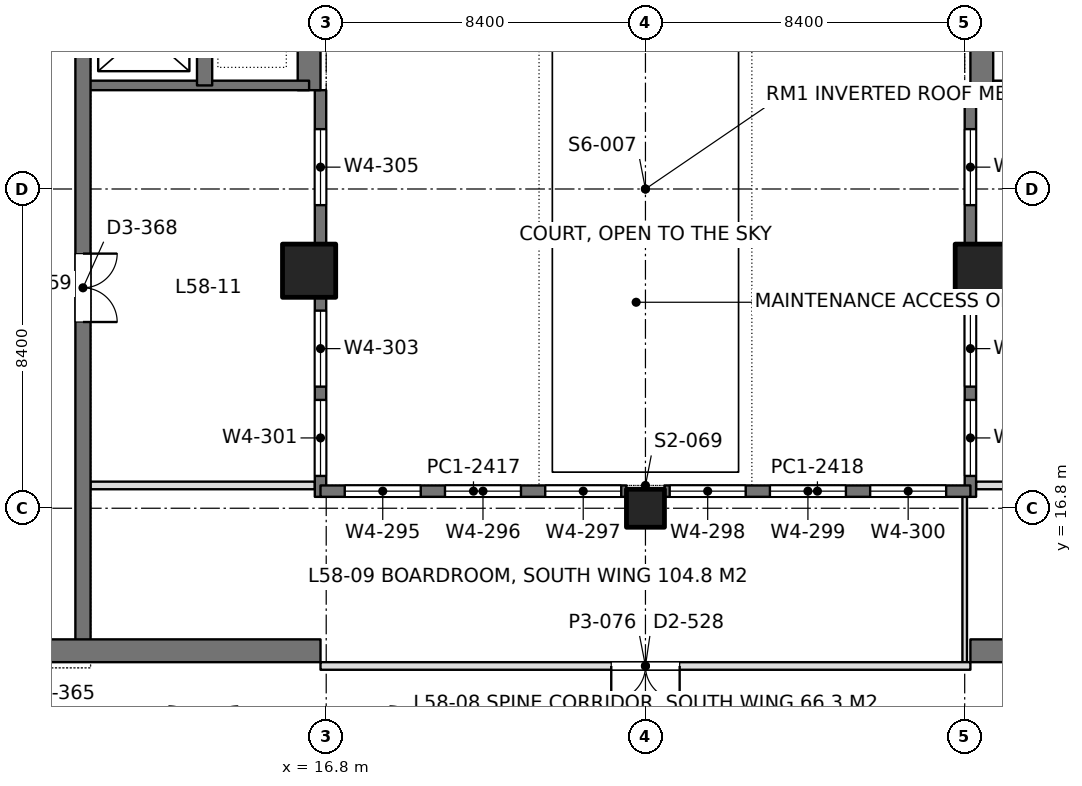
"""IFC4 building model, lengths in metres.
Left out: names, types, materials, properties, quantities, classifications, styles, units other than length and angle.
Written with IfcOpenShell. Run it as: python <this file> out.ifc"""

import sys

from ifc_helpers import new_model, si_unit, direction, frame, frame_2d, origin, origin_2d, place, context, subcontext, project, spatial, rectangle, extrude, element, fill, save


model = new_model("IFC4")
c1 = context("Model", 3, precision=1e-05, world=origin(), true_north=direction((0.0, 1.0)))
c2 = subcontext(c1, "Body", "Model", "MODEL_VIEW")
j1 = project(units=[si_unit("LENGTHUNIT", "METRE"), si_unit("PLANEANGLEUNIT", "RADIAN")], contexts=[c1])
p1 = place(None, origin())
s1 = spatial("IfcSite", under=j1, at=p1, CompositionType="ELEMENT")
p2 = place(p1, origin())
s2 = spatial("IfcBuilding", under=s1, at=p2, CompositionType="ELEMENT")
p3 = place(p2, frame((0.0, 0.0, 254.7)))
s3 = spatial("IfcBuildingStorey", under=s2, at=p3, CompositionType="ELEMENT", Elevation=254.7)
p4 = place(p3, frame((25.2, 16.8, 0.0), z_axis=(0.0, 0.0, 1.0), x_axis=(1.0, 0.0, 0.0)))
e1 = element("IfcColumn", 1, at=p4, inside=s3, PredefinedType="COLUMN", context=c2, shape_type="SweptSolid", body=[
    extrude(rectangle(XDim=1.0, YDim=1.0, at=origin_2d()), origin(), (0.0, 0.0, 1.0), 4.5),
])
for number, where, z_axis, x_axis in (
    (2, (16.35, 23.05, 0.0), (0.0, 0.0, 1.0), (1.0, 0.0, 0.0)),
    (3, (34.05, 23.05, 0.0), (0.0, 0.0, 1.0), (1.0, 0.0, 0.0)),
):
    element("IfcColumn", number, at=place(p3, frame(where, z_axis=z_axis, x_axis=x_axis)), inside=s3, PredefinedType="COLUMN", context=c2, shape_type="SweptSolid", body=[
        extrude(rectangle(XDim=1.4, YDim=1.4, at=origin_2d()), origin(), (0.0, 0.0, 1.0), 4.5),
    ])
p5 = place(p3, frame((-1.05, 13.05, 0.0), z_axis=(0.0, 0.0, 1.0), x_axis=(1.0, 0.0, 0.0)))
e4 = element("IfcWall", 4, at=p5, inside=s3, PredefinedType="SHEAR", context=c2, shape_type="SweptSolid", body=[
    extrude(rectangle(XDim=17.7, YDim=0.6, at=frame_2d((8.85, 0.0))), origin(), (0.0, 0.0, 1.0), 4.5),
])
p6 = place(p5, frame((8.8, 0.0, 0.0)))
e5 = element("IfcOpeningElement", 5, at=p6, cuts=e4, PredefinedType="OPENING", context=c2, shape_type="SweptSolid", body=[
    extrude(rectangle(XDim=1.8, YDim=2.4, at=frame_2d((0.9, 1.2))), frame((0.0, 0.31, 0.0), z_axis=(0.0, -1.0, 0.0), x_axis=(1.0, 0.0, 0.0)), (0.0, 0.0, 1.0), 0.62),
])
p7 = place(p3, frame((16.35, 27.8, 0.0), z_axis=(0.0, 0.0, 1.0), x_axis=(0.0, 1.0, 0.0)))
e6 = element("IfcWall", 6, at=p7, inside=s3, PredefinedType="SHEAR", context=c2, shape_type="SweptSolid", body=[
    extrude(rectangle(XDim=9.55, YDim=0.6, at=frame_2d((4.775, 0.0))), origin(), (0.0, 0.0, 1.0), 4.5),
])
p8 = place(p3, frame((10.4, 13.05, 0.0), z_axis=(0.0, 0.0, 1.0), x_axis=(0.0, 1.0, 0.0)))
e7 = element("IfcWall", 7, at=p8, inside=s3, PredefinedType="SHEAR", context=c2, shape_type="SweptSolid", body=[
    extrude(rectangle(XDim=24.3, YDim=0.4, at=frame_2d((12.15, 0.0))), origin(), (0.0, 0.0, 1.0), 4.5),
])
p9 = place(p8, frame((15.75, 0.0, 0.0)))
e8 = element("IfcOpeningElement", 8, at=p9, cuts=e7, PredefinedType="OPENING", context=c2, shape_type="SweptSolid", body=[
    extrude(rectangle(XDim=1.1, YDim=2.2, at=frame_2d((0.55, 1.1))), frame((0.0, 0.21, 0.0), z_axis=(0.0, -1.0, 0.0), x_axis=(1.0, 0.0, 0.0)), (0.0, 0.0, 1.0), 0.42),
])
p10 = place(p8, frame((18.6, 0.0, 0.0)))
e9 = element("IfcOpeningElement", 9, at=p10, cuts=e7, PredefinedType="OPENING", context=c2, shape_type="SweptSolid", body=[
    extrude(rectangle(XDim=1.1, YDim=2.2, at=frame_2d((0.55, 1.1))), frame((0.0, 0.21, 0.0), z_axis=(0.0, -1.0, 0.0), x_axis=(1.0, 0.0, 0.0)), (0.0, 0.0, 1.0), 0.42),
])
p11 = place(p8, frame((21.45, 0.0, 0.0)))
e10 = element("IfcOpeningElement", 10, at=p11, cuts=e7, PredefinedType="OPENING", context=c2, shape_type="SweptSolid", body=[
    extrude(rectangle(XDim=1.1, YDim=2.2, at=frame_2d((0.55, 1.1))), frame((0.0, 0.21, 0.0), z_axis=(0.0, -1.0, 0.0), x_axis=(1.0, 0.0, 0.0)), (0.0, 0.0, 1.0), 0.42),
])
p12 = place(p8, frame((8.65, 0.0, 0.0)))
e11 = element("IfcOpeningElement", 11, at=p12, cuts=e7, PredefinedType="OPENING", context=c2, shape_type="SweptSolid", body=[
    extrude(rectangle(XDim=1.8, YDim=2.4, at=frame_2d((0.9, 1.2))), frame((0.0, 0.21, 0.0), z_axis=(0.0, -1.0, 0.0), x_axis=(1.0, 0.0, 0.0)), (0.0, 0.0, 1.0), 0.42),
])
p13 = place(p3, frame((13.6, 27.925, 0.0), z_axis=(0.0, 0.0, 1.0), x_axis=(0.0, 1.0, 0.0)))
e12 = element("IfcWall", 12, at=p13, inside=s3, PredefinedType="SHEAR", context=c2, shape_type="SweptSolid", body=[
    extrude(rectangle(XDim=9.425, YDim=0.4, at=frame_2d((4.712, 0.0))), origin(), (0.0, 0.0, 1.0), 4.5),
])
p14 = place(p3, frame((10.4, 27.925, 0.0), z_axis=(0.0, 0.0, 1.0), x_axis=(1.0, 0.0, 0.0)))
e13 = element("IfcWall", 13, at=p14, inside=s3, PredefinedType="SHEAR", context=c2, shape_type="SweptSolid", body=[
    extrude(rectangle(XDim=5.95, YDim=0.25, at=frame_2d((2.975, 0.0))), origin(), (0.0, 0.0, 1.0), 4.5),
])
p15 = place(p3, frame((33.75, 13.05, 0.0), z_axis=(0.0, 0.0, 1.0), x_axis=(1.0, 0.0, 0.0)))
e14 = element("IfcWall", 14, at=p15, inside=s3, PredefinedType="SHEAR", context=c2, shape_type="SweptSolid", body=[
    extrude(rectangle(XDim=17.7, YDim=0.6, at=frame_2d((8.85, 0.0))), origin(), (0.0, 0.0, 1.0), 4.5),
])
p16 = place(p15, frame((7.1, 0.0, 0.0)))
e15 = element("IfcOpeningElement", 15, at=p16, cuts=e14, PredefinedType="OPENING", context=c2, shape_type="SweptSolid", body=[
    extrude(rectangle(XDim=1.8, YDim=2.4, at=frame_2d((0.9, 1.2))), frame((0.0, 0.31, 0.0), z_axis=(0.0, -1.0, 0.0), x_axis=(1.0, 0.0, 0.0)), (0.0, 0.0, 1.0), 0.62),
])
p17 = place(p3, frame((34.05, 27.8, 0.0), z_axis=(0.0, 0.0, 1.0), x_axis=(0.0, 1.0, 0.0)))
e16 = element("IfcWall", 16, at=p17, inside=s3, PredefinedType="SHEAR", context=c2, shape_type="SweptSolid", body=[
    extrude(rectangle(XDim=9.55, YDim=0.6, at=frame_2d((4.775, 0.0))), origin(), (0.0, 0.0, 1.0), 4.5),
])
p18 = place(p3, frame((40.0, 27.925, 0.0), z_axis=(0.0, 0.0, 1.0), x_axis=(-1.0, 0.0, 0.0)))
e17 = element("IfcWall", 17, at=p18, inside=s3, PredefinedType="SHEAR", context=c2, shape_type="SweptSolid", body=[
    extrude(rectangle(XDim=5.95, YDim=0.25, at=frame_2d((2.975, 0.0))), origin(), (0.0, 0.0, 1.0), 4.5),
])
p19 = place(p3, frame((16.65, 17.1, 0.0), z_axis=(0.0, 0.0, 1.0), x_axis=(0.0, 1.0, 0.0)))
e18 = element("IfcWall", 18, at=p19, inside=s3, PredefinedType="SOLIDWALL", context=c2, shape_type="SweptSolid", body=[
    extrude(rectangle(XDim=10.7, YDim=0.3, at=frame_2d((5.35, 0.0))), origin(), (0.0, 0.0, 1.0), 4.35),
])
p20 = place(p19, frame((0.55, 0.0, 0.9)))
e19 = element("IfcOpeningElement", 19, at=p20, cuts=e18, PredefinedType="OPENING", context=c2, shape_type="SweptSolid", body=[
    extrude(rectangle(XDim=2.0, YDim=1.9, at=frame_2d((1.0, 0.95))), frame((0.0, 0.16, 0.0), z_axis=(0.0, -1.0, 0.0), x_axis=(1.0, 0.0, 0.0)), (0.0, 0.0, 1.0), 0.32),
])
p21 = place(p19, frame((2.9, 0.0, 0.9)))
e20 = element("IfcOpeningElement", 20, at=p21, cuts=e18, PredefinedType="OPENING", context=c2, shape_type="SweptSolid", body=[
    extrude(rectangle(XDim=2.0, YDim=1.9, at=frame_2d((1.0, 0.95))), frame((0.0, 0.16, 0.0), z_axis=(0.0, -1.0, 0.0), x_axis=(1.0, 0.0, 0.0)), (0.0, 0.0, 1.0), 0.32),
])
p22 = place(p19, frame((7.675, 0.0, 0.9)))
e21 = element("IfcOpeningElement", 21, at=p22, cuts=e18, PredefinedType="OPENING", context=c2, shape_type="SweptSolid", body=[
    extrude(rectangle(XDim=2.0, YDim=1.9, at=frame_2d((1.0, 0.95))), frame((0.0, 0.16, 0.0), z_axis=(0.0, -1.0, 0.0), x_axis=(1.0, 0.0, 0.0)), (0.0, 0.0, 1.0), 0.32),
])
p23 = place(p3, frame((33.75, 17.1, 0.0), z_axis=(0.0, 0.0, 1.0), x_axis=(0.0, 1.0, 0.0)))
e22 = element("IfcWall", 22, at=p23, inside=s3, PredefinedType="SOLIDWALL", context=c2, shape_type="SweptSolid", body=[
    extrude(rectangle(XDim=10.7, YDim=0.3, at=frame_2d((5.35, 0.0))), origin(), (0.0, 0.0, 1.0), 4.35),
])
p24 = place(p23, frame((0.55, 0.0, 0.9)))
e23 = element("IfcOpeningElement", 23, at=p24, cuts=e22, PredefinedType="OPENING", context=c2, shape_type="SweptSolid", body=[
    extrude(rectangle(XDim=2.0, YDim=1.9, at=frame_2d((1.0, 0.95))), frame((0.0, 0.16, 0.0), z_axis=(0.0, -1.0, 0.0), x_axis=(1.0, 0.0, 0.0)), (0.0, 0.0, 1.0), 0.32),
])
p25 = place(p23, frame((2.9, 0.0, 0.9)))
e24 = element("IfcOpeningElement", 24, at=p25, cuts=e22, PredefinedType="OPENING", context=c2, shape_type="SweptSolid", body=[
    extrude(rectangle(XDim=2.0, YDim=1.9, at=frame_2d((1.0, 0.95))), frame((0.0, 0.16, 0.0), z_axis=(0.0, -1.0, 0.0), x_axis=(1.0, 0.0, 0.0)), (0.0, 0.0, 1.0), 0.32),
])
p26 = place(p23, frame((7.675, 0.0, 0.9)))
e25 = element("IfcOpeningElement", 25, at=p26, cuts=e22, PredefinedType="OPENING", context=c2, shape_type="SweptSolid", body=[
    extrude(rectangle(XDim=2.0, YDim=1.9, at=frame_2d((1.0, 0.95))), frame((0.0, 0.16, 0.0), z_axis=(0.0, -1.0, 0.0), x_axis=(1.0, 0.0, 0.0)), (0.0, 0.0, 1.0), 0.32),
])
p27 = place(p3, frame((16.65, 17.25, 0.0), z_axis=(0.0, 0.0, 1.0), x_axis=(1.0, 0.0, 0.0)))
e26 = element("IfcWall", 26, at=p27, inside=s3, PredefinedType="SOLIDWALL", context=c2, shape_type="SweptSolid", body=[
    extrude(rectangle(XDim=8.05, YDim=0.3, at=frame_2d((4.025, 0.0))), origin(), (0.0, 0.0, 1.0), 4.35),
])
p28 = place(p27, frame((0.637, 0.0, 0.9)))
e27 = element("IfcOpeningElement", 27, at=p28, cuts=e26, PredefinedType="OPENING", context=c2, shape_type="SweptSolid", body=[
    extrude(rectangle(XDim=2.0, YDim=1.9, at=frame_2d((1.0, 0.95))), frame((0.0, 0.16, 0.0), z_axis=(0.0, -1.0, 0.0), x_axis=(1.0, 0.0, 0.0)), (0.0, 0.0, 1.0), 0.32),
])
p29 = place(p27, frame((3.275, 0.0, 0.9)))
e28 = element("IfcOpeningElement", 28, at=p29, cuts=e26, PredefinedType="OPENING", context=c2, shape_type="SweptSolid", body=[
    extrude(rectangle(XDim=2.0, YDim=1.9, at=frame_2d((1.0, 0.95))), frame((0.0, 0.16, 0.0), z_axis=(0.0, -1.0, 0.0), x_axis=(1.0, 0.0, 0.0)), (0.0, 0.0, 1.0), 0.32),
])
p30 = place(p27, frame((5.913, 0.0, 0.9)))
e29 = element("IfcOpeningElement", 29, at=p30, cuts=e26, PredefinedType="OPENING", context=c2, shape_type="SweptSolid", body=[
    extrude(rectangle(XDim=2.0, YDim=1.9, at=frame_2d((1.0, 0.95))), frame((0.0, 0.16, 0.0), z_axis=(0.0, -1.0, 0.0), x_axis=(1.0, 0.0, 0.0)), (0.0, 0.0, 1.0), 0.32),
])
p31 = place(p3, frame((25.7, 17.25, 0.0), z_axis=(0.0, 0.0, 1.0), x_axis=(1.0, 0.0, 0.0)))
e30 = element("IfcWall", 30, at=p31, inside=s3, PredefinedType="SOLIDWALL", context=c2, shape_type="SweptSolid", body=[
    extrude(rectangle(XDim=8.05, YDim=0.3, at=frame_2d((4.025, 0.0))), origin(), (0.0, 0.0, 1.0), 4.35),
])
p32 = place(p31, frame((0.137, 0.0, 0.9)))
e31 = element("IfcOpeningElement", 31, at=p32, cuts=e30, PredefinedType="OPENING", context=c2, shape_type="SweptSolid", body=[
    extrude(rectangle(XDim=2.0, YDim=1.9, at=frame_2d((1.0, 0.95))), frame((0.0, 0.16, 0.0), z_axis=(0.0, -1.0, 0.0), x_axis=(1.0, 0.0, 0.0)), (0.0, 0.0, 1.0), 0.32),
])
p33 = place(p31, frame((2.775, 0.0, 0.9)))
e32 = element("IfcOpeningElement", 32, at=p33, cuts=e30, PredefinedType="OPENING", context=c2, shape_type="SweptSolid", body=[
    extrude(rectangle(XDim=2.0, YDim=1.9, at=frame_2d((1.0, 0.95))), frame((0.0, 0.16, 0.0), z_axis=(0.0, -1.0, 0.0), x_axis=(1.0, 0.0, 0.0)), (0.0, 0.0, 1.0), 0.32),
])
p34 = place(p31, frame((5.413, 0.0, 0.9)))
e33 = element("IfcOpeningElement", 33, at=p34, cuts=e30, PredefinedType="OPENING", context=c2, shape_type="SweptSolid", body=[
    extrude(rectangle(XDim=2.0, YDim=1.9, at=frame_2d((1.0, 0.95))), frame((0.0, 0.16, 0.0), z_axis=(0.0, -1.0, 0.0), x_axis=(1.0, 0.0, 0.0)), (0.0, 0.0, 1.0), 0.32),
])
for number, where, z_axis, x_axis in (
    (34, (10.598, 17.4, 0.0), (0.0, 0.0, 1.0), (1.0, 0.0, 0.0)),
    (35, (33.898, 17.4, 0.0), (0.0, 0.0, 1.0), (1.0, 0.0, 0.0)),
):
    element("IfcWall", number, at=place(p3, frame(where, z_axis=z_axis, x_axis=x_axis)), inside=s3, PredefinedType="PARTITIONING", context=c2, shape_type="SweptSolid", body=[
        extrude(rectangle(XDim=5.904, YDim=0.2, at=frame_2d((2.952, 0.0))), origin(), (0.0, 0.0, 1.0), 3.8),
    ])
p35 = place(p3, frame((33.6, 12.6, 0.0), z_axis=(0.0, 0.0, 1.0), x_axis=(0.0, 1.0, 0.0)))
e36 = element("IfcWall", 36, at=p35, inside=s3, PredefinedType="PARTITIONING", context=c2, shape_type="SweptSolid", body=[
    extrude(rectangle(XDim=4.502, YDim=0.12, at=frame_2d((2.251, 0.0))), origin(), (0.0, 0.0, 1.0), 3.66),
])
p36 = place(p3, frame((16.65, 12.65, 0.0), z_axis=(0.0, 0.0, 1.0), x_axis=(1.0, 0.0, 0.0)))
e37 = element("IfcWall", 37, at=p36, inside=s3, PredefinedType="PARTITIONING", context=c2, shape_type="SweptSolid", body=[
    extrude(rectangle(XDim=17.1, YDim=0.2, at=frame_2d((8.55, 0.0))), origin(), (0.0, 0.0, 1.0), 3.8),
])
p37 = place(p36, frame((7.65, 0.0, 0.0)))
e38 = element("IfcOpeningElement", 38, at=p37, cuts=e37, PredefinedType="OPENING", context=c2, shape_type="SweptSolid", body=[
    extrude(rectangle(XDim=1.8, YDim=2.2, at=frame_2d((0.9, 1.1))), frame((0.0, 0.11, 0.0), z_axis=(0.0, -1.0, 0.0), x_axis=(1.0, 0.0, 0.0)), (0.0, 0.0, 1.0), 0.22),
])
p38 = place(p20, origin())
e39 = element("IfcWindow", 39, at=p38, inside=s3, PartitioningType="SINGLE_PANEL", PredefinedType="WINDOW", context=c2, shape_type="SweptSolid", body=[
    extrude(rectangle(XDim=2.0, YDim=1.9, at=frame_2d((1.0, 0.95))), frame((0.0, 0.03, 0.0), z_axis=(0.0, -1.0, 0.0), x_axis=(1.0, 0.0, 0.0)), (0.0, 0.0, 1.0), 0.06),
])
fill(e19, e39)
p39 = place(p21, origin())
e40 = element("IfcWindow", 40, at=p39, inside=s3, PartitioningType="SINGLE_PANEL", PredefinedType="WINDOW", context=c2, shape_type="SweptSolid", body=[
    extrude(rectangle(XDim=2.0, YDim=1.9, at=frame_2d((1.0, 0.95))), frame((0.0, 0.03, 0.0), z_axis=(0.0, -1.0, 0.0), x_axis=(1.0, 0.0, 0.0)), (0.0, 0.0, 1.0), 0.06),
])
fill(e20, e40)
p40 = place(p22, origin())
e41 = element("IfcWindow", 41, at=p40, inside=s3, PartitioningType="SINGLE_PANEL", PredefinedType="WINDOW", context=c2, shape_type="SweptSolid", body=[
    extrude(rectangle(XDim=2.0, YDim=1.9, at=frame_2d((1.0, 0.95))), frame((0.0, 0.03, 0.0), z_axis=(0.0, -1.0, 0.0), x_axis=(1.0, 0.0, 0.0)), (0.0, 0.0, 1.0), 0.06),
])
fill(e21, e41)
p41 = place(p24, origin())
e42 = element("IfcWindow", 42, at=p41, inside=s3, PartitioningType="SINGLE_PANEL", PredefinedType="WINDOW", context=c2, shape_type="SweptSolid", body=[
    extrude(rectangle(XDim=2.0, YDim=1.9, at=frame_2d((1.0, 0.95))), frame((0.0, 0.03, 0.0), z_axis=(0.0, -1.0, 0.0), x_axis=(1.0, 0.0, 0.0)), (0.0, 0.0, 1.0), 0.06),
])
fill(e23, e42)
p42 = place(p25, origin())
e43 = element("IfcWindow", 43, at=p42, inside=s3, PartitioningType="SINGLE_PANEL", PredefinedType="WINDOW", context=c2, shape_type="SweptSolid", body=[
    extrude(rectangle(XDim=2.0, YDim=1.9, at=frame_2d((1.0, 0.95))), frame((0.0, 0.03, 0.0), z_axis=(0.0, -1.0, 0.0), x_axis=(1.0, 0.0, 0.0)), (0.0, 0.0, 1.0), 0.06),
])
fill(e24, e43)
p43 = place(p26, origin())
e44 = element("IfcWindow", 44, at=p43, inside=s3, PartitioningType="SINGLE_PANEL", PredefinedType="WINDOW", context=c2, shape_type="SweptSolid", body=[
    extrude(rectangle(XDim=2.0, YDim=1.9, at=frame_2d((1.0, 0.95))), frame((0.0, 0.03, 0.0), z_axis=(0.0, -1.0, 0.0), x_axis=(1.0, 0.0, 0.0)), (0.0, 0.0, 1.0), 0.06),
])
fill(e25, e44)
p44 = place(p28, origin())
e45 = element("IfcWindow", 45, at=p44, inside=s3, PartitioningType="SINGLE_PANEL", PredefinedType="WINDOW", context=c2, shape_type="SweptSolid", body=[
    extrude(rectangle(XDim=2.0, YDim=1.9, at=frame_2d((1.0, 0.95))), frame((0.0, 0.03, 0.0), z_axis=(0.0, -1.0, 0.0), x_axis=(1.0, 0.0, 0.0)), (0.0, 0.0, 1.0), 0.06),
])
fill(e27, e45)
p45 = place(p29, origin())
e46 = element("IfcWindow", 46, at=p45, inside=s3, PartitioningType="SINGLE_PANEL", PredefinedType="WINDOW", context=c2, shape_type="SweptSolid", body=[
    extrude(rectangle(XDim=2.0, YDim=1.9, at=frame_2d((1.0, 0.95))), frame((0.0, 0.03, 0.0), z_axis=(0.0, -1.0, 0.0), x_axis=(1.0, 0.0, 0.0)), (0.0, 0.0, 1.0), 0.06),
])
fill(e28, e46)
p46 = place(p30, origin())
e47 = element("IfcWindow", 47, at=p46, inside=s3, PartitioningType="SINGLE_PANEL", PredefinedType="WINDOW", context=c2, shape_type="SweptSolid", body=[
    extrude(rectangle(XDim=2.0, YDim=1.9, at=frame_2d((1.0, 0.95))), frame((0.0, 0.03, 0.0), z_axis=(0.0, -1.0, 0.0), x_axis=(1.0, 0.0, 0.0)), (0.0, 0.0, 1.0), 0.06),
])
fill(e29, e47)
p47 = place(p32, origin())
e48 = element("IfcWindow", 48, at=p47, inside=s3, PartitioningType="SINGLE_PANEL", PredefinedType="WINDOW", context=c2, shape_type="SweptSolid", body=[
    extrude(rectangle(XDim=2.0, YDim=1.9, at=frame_2d((1.0, 0.95))), frame((0.0, 0.03, 0.0), z_axis=(0.0, -1.0, 0.0), x_axis=(1.0, 0.0, 0.0)), (0.0, 0.0, 1.0), 0.06),
])
fill(e31, e48)
p48 = place(p33, origin())
e49 = element("IfcWindow", 49, at=p48, inside=s3, PartitioningType="SINGLE_PANEL", PredefinedType="WINDOW", context=c2, shape_type="SweptSolid", body=[
    extrude(rectangle(XDim=2.0, YDim=1.9, at=frame_2d((1.0, 0.95))), frame((0.0, 0.03, 0.0), z_axis=(0.0, -1.0, 0.0), x_axis=(1.0, 0.0, 0.0)), (0.0, 0.0, 1.0), 0.06),
])
fill(e32, e49)
p49 = place(p34, origin())
e50 = element("IfcWindow", 50, at=p49, inside=s3, PartitioningType="SINGLE_PANEL", PredefinedType="WINDOW", context=c2, shape_type="SweptSolid", body=[
    extrude(rectangle(XDim=2.0, YDim=1.9, at=frame_2d((1.0, 0.95))), frame((0.0, 0.03, 0.0), z_axis=(0.0, -1.0, 0.0), x_axis=(1.0, 0.0, 0.0)), (0.0, 0.0, 1.0), 0.06),
])
fill(e33, e50)
p50 = place(p12, frame((1.8, 0.0, 0.0), z_axis=(0.0, 0.0, 1.0), x_axis=(-1.0, 0.0, 0.0)))
e51 = element("IfcDoor", 51, at=p50, inside=s3, OperationType="DOUBLE_DOOR_SINGLE_SWING", PredefinedType="DOOR", context=c2, shape_type="SweptSolid", body=[
    extrude(rectangle(XDim=1.8, YDim=2.4, at=frame_2d((0.9, 1.2))), frame((0.0, 0.025, 0.0), z_axis=(0.0, -1.0, 0.0), x_axis=(1.0, 0.0, 0.0)), (0.0, 0.0, 1.0), 0.05),
])
fill(e11, e51)
p51 = place(p37, frame((1.8, 0.0, 0.0), z_axis=(0.0, 0.0, 1.0), x_axis=(-1.0, 0.0, 0.0)))
e52 = element("IfcDoor", 52, at=p51, inside=s3, OperationType="DOUBLE_DOOR_SINGLE_SWING", PredefinedType="DOOR", context=c2, shape_type="SweptSolid", body=[
    extrude(rectangle(XDim=1.8, YDim=2.2, at=frame_2d((0.9, 1.1))), frame((0.0, 0.025, 0.0), z_axis=(0.0, -1.0, 0.0), x_axis=(1.0, 0.0, 0.0)), (0.0, 0.0, 1.0), 0.05),
])
fill(e38, e52)
save(model, sys.argv[1])
